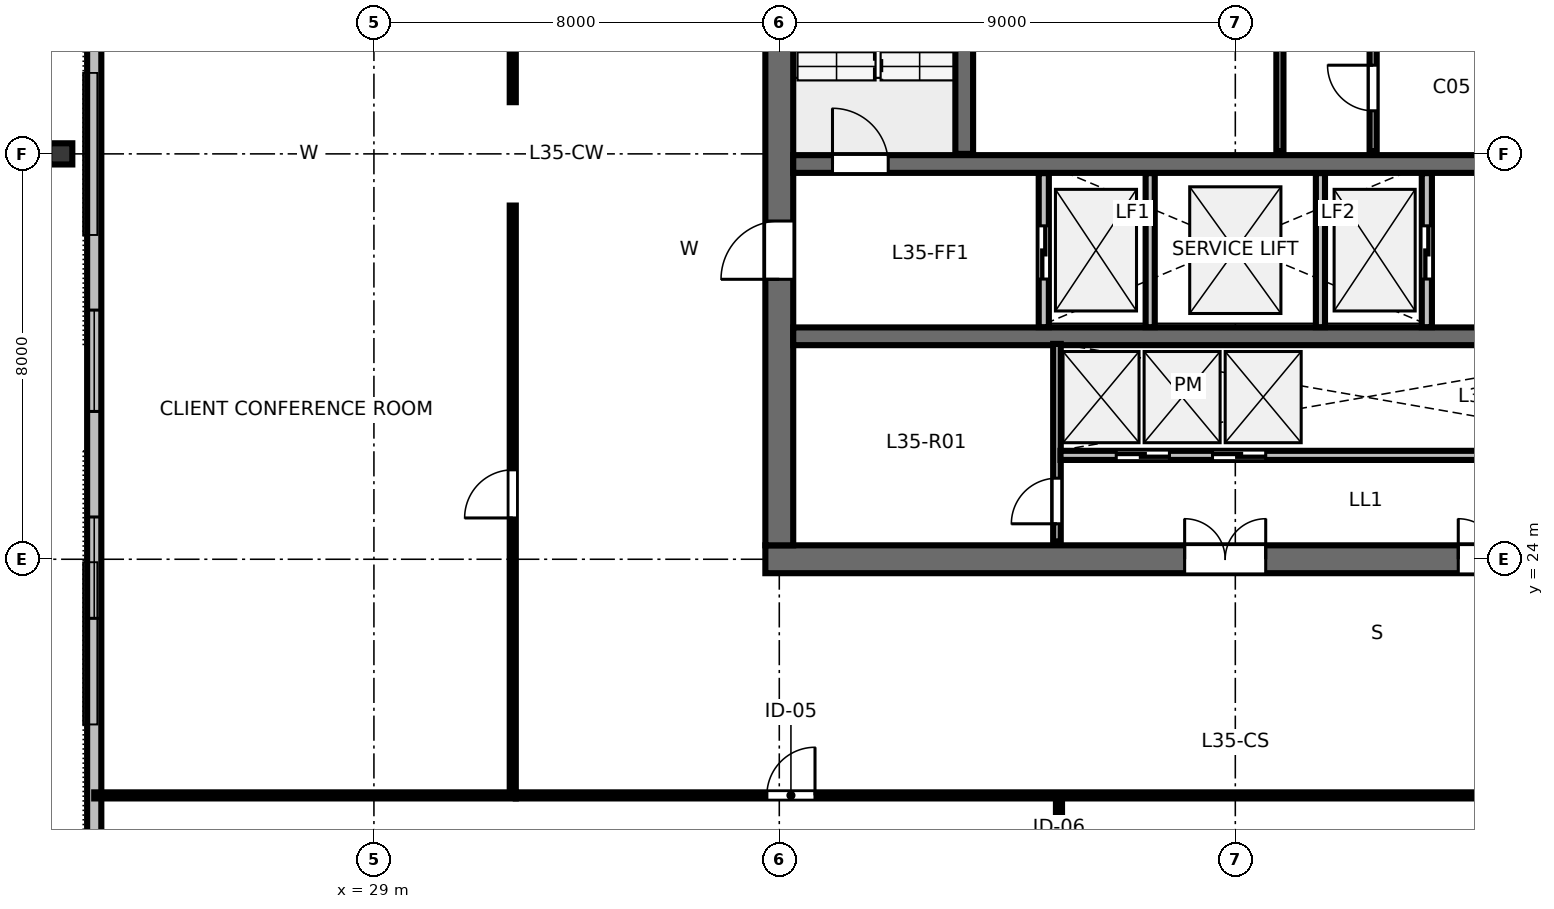
"""IFC4 building model, lengths in metres.
Left out: names, types, materials, properties, quantities, classifications, styles, units other than length and angle.
Written with IfcOpenShell. Run it as: python <this file> out.ifc"""

import sys

from ifc_helpers import new_model, si_unit, direction, frame, frame_2d, origin, origin_2d, place, context, subcontext, project, spatial, rectangle, i_section, extrude, element, fill, save


model = new_model("IFC4")
c1 = context("Model", 3, precision=1e-05, world=origin(), true_north=direction((0.0, 1.0)))
c2 = subcontext(c1, "Body", "Model", "MODEL_VIEW")
j1 = project(units=[si_unit("LENGTHUNIT", "METRE"), si_unit("PLANEANGLEUNIT", "RADIAN")], contexts=[c1])
p1 = place(None, origin())
s1 = spatial("IfcSite", under=j1, at=p1, CompositionType="ELEMENT")
p2 = place(p1, origin())
s2 = spatial("IfcBuilding", under=s1, at=p2, CompositionType="ELEMENT")
p3 = place(p2, frame((0.0, 0.0, 134.8)))
s3 = spatial("IfcBuildingStorey", under=s2, at=p3, CompositionType="ELEMENT", Elevation=134.8)
p4 = place(p3, frame((36.725, 24.0, 0.0), z_axis=(0.0, 0.0, 1.0), x_axis=(1.0, 0.0, 0.0)))
e1 = element("IfcWall", 1, at=p4, inside=s3, PredefinedType="SHEAR", context=c2, shape_type="SweptSolid", body=[
    extrude(rectangle(XDim=18.55, YDim=0.55, at=frame_2d((9.275, 0.0))), origin(), (0.0, 0.0, 1.0), 3.36),
])
p5 = place(p4, frame((8.275, 0.0, 0.0)))
e2 = element("IfcOpeningElement", 2, at=p5, cuts=e1, PredefinedType="OPENING", context=c2, shape_type="SweptSolid", body=[
    extrude(rectangle(XDim=1.6, YDim=2.15, at=frame_2d((0.8, 1.075))), frame((0.0, 0.285, 0.0), z_axis=(0.0, -1.0, 0.0), x_axis=(1.0, 0.0, 0.0)), (0.0, 0.0, 1.0), 0.57),
])
p6 = place(p4, frame((13.675, 0.0, 0.0)))
e3 = element("IfcOpeningElement", 3, at=p6, cuts=e1, PredefinedType="OPENING", context=c2, shape_type="SweptSolid", body=[
    extrude(rectangle(XDim=1.6, YDim=2.15, at=frame_2d((0.8, 1.075))), frame((0.0, 0.285, 0.0), z_axis=(0.0, -1.0, 0.0), x_axis=(1.0, 0.0, 0.0)), (0.0, 0.0, 1.0), 0.57),
])
p7 = place(p3, frame((37.0, 24.275, 0.0), z_axis=(0.0, 0.0, 1.0), x_axis=(0.0, 1.0, 0.0)))
e4 = element("IfcWall", 4, at=p7, inside=s3, PredefinedType="SHEAR", context=c2, shape_type="SweptSolid", body=[
    extrude(rectangle(XDim=15.45, YDim=0.55, at=frame_2d((7.725, 0.0))), origin(), (0.0, 0.0, 1.0), 3.36),
])
p8 = place(p7, frame((5.25, 0.0, 0.0)))
e5 = element("IfcOpeningElement", 5, at=p8, cuts=e4, PredefinedType="OPENING", context=c2, shape_type="SweptSolid", body=[
    extrude(rectangle(XDim=1.15, YDim=2.15, at=frame_2d((0.575, 1.075))), frame((0.0, 0.285, 0.0), z_axis=(0.0, -1.0, 0.0), x_axis=(1.0, 0.0, 0.0)), (0.0, 0.0, 1.0), 0.57),
])
p9 = place(p3, frame((37.275, 31.8, 0.0), z_axis=(0.0, 0.0, 1.0), x_axis=(1.0, 0.0, 0.0)))
e6 = element("IfcWall", 6, at=p9, inside=s3, PredefinedType="SHEAR", context=c2, shape_type="SweptSolid", body=[
    extrude(rectangle(XDim=17.45, YDim=0.35, at=frame_2d((8.725, 0.0))), origin(), (0.0, 0.0, 1.0), 3.36),
])
p10 = place(p9, frame((0.775, 0.0, 0.0)))
e7 = element("IfcOpeningElement", 7, at=p10, cuts=e6, PredefinedType="OPENING", context=c2, shape_type="SweptSolid", body=[
    extrude(rectangle(XDim=1.1, YDim=2.15, at=frame_2d((0.55, 1.075))), frame((0.0, 0.185, 0.0), z_axis=(0.0, -1.0, 0.0), x_axis=(1.0, 0.0, 0.0)), (0.0, 0.0, 1.0), 0.37),
])
p11 = place(p9, frame((14.675, 0.0, 0.0)))
e8 = element("IfcOpeningElement", 8, at=p11, cuts=e6, PredefinedType="OPENING", context=c2, shape_type="SweptSolid", body=[
    extrude(rectangle(XDim=1.1, YDim=2.15, at=frame_2d((0.55, 1.075))), frame((0.0, 0.185, 0.0), z_axis=(0.0, -1.0, 0.0), x_axis=(1.0, 0.0, 0.0)), (0.0, 0.0, 1.0), 0.37),
])
p12 = place(p3, frame((37.275, 28.4, 0.0), z_axis=(0.0, 0.0, 1.0), x_axis=(1.0, 0.0, 0.0)))
e9 = element("IfcWall", 9, at=p12, inside=s3, PredefinedType="SHEAR", context=c2, shape_type="SweptSolid", body=[
    extrude(rectangle(XDim=17.45, YDim=0.35, at=frame_2d((8.725, 0.0))), origin(), (0.0, 0.0, 1.0), 3.36),
])
p13 = place(p3, frame((22.82, 32.0, 0.0), z_axis=(-0.089001216718, 0.0, 0.996031517284), x_axis=(0.996031517284, 0.0, 0.089001216718)))
e10 = element("IfcColumn", 10, at=p13, inside=s3, PredefinedType="COLUMN", context=c2, shape_type="SweptSolid", body=[
    extrude(i_section(OverallWidth=0.418, OverallDepth=0.455, WebThickness=0.042, FlangeThickness=0.068, FilletRadius=0.025, at=origin_2d()), origin(), (0.0, 0.0, 1.0), 3.371),
])
p14 = place(p3, frame((23.48, 47.39, 0.0), z_axis=(0.0, 0.0, 1.0), x_axis=(0.0, -1.0, 0.0)))
e11 = element("IfcWall", 11, at=p14, inside=s3, PredefinedType="STANDARD", context=c2, shape_type="SweptSolid", body=[
    extrude(rectangle(XDim=30.78, YDim=0.28, at=frame_2d((15.39, 0.0))), origin(), (0.0, 0.0, 1.0), 3.36),
])
p15 = place(p14, frame((6.224, 0.0, 0.8)))
e12 = element("IfcOpeningElement", 12, at=p15, cuts=e11, PredefinedType="OPENING", context=c2, shape_type="SweptSolid", body=[
    extrude(rectangle(XDim=2.0, YDim=1.95, at=frame_2d((1.0, 0.975))), frame((0.0, 0.15, 0.0), z_axis=(0.0, -1.0, 0.0), x_axis=(1.0, 0.0, 0.0)), (0.0, 0.0, 1.0), 0.3),
])
p16 = place(p14, frame((10.307, 0.0, 0.8)))
e13 = element("IfcOpeningElement", 13, at=p16, cuts=e11, PredefinedType="OPENING", context=c2, shape_type="SweptSolid", body=[
    extrude(rectangle(XDim=2.0, YDim=1.95, at=frame_2d((1.0, 0.975))), frame((0.0, 0.15, 0.0), z_axis=(0.0, -1.0, 0.0), x_axis=(1.0, 0.0, 0.0)), (0.0, 0.0, 1.0), 0.3),
])
p17 = place(p14, frame((18.473, 0.0, 0.8)))
e14 = element("IfcOpeningElement", 14, at=p17, cuts=e11, PredefinedType="OPENING", context=c2, shape_type="SweptSolid", body=[
    extrude(rectangle(XDim=2.0, YDim=1.95, at=frame_2d((1.0, 0.975))), frame((0.0, 0.15, 0.0), z_axis=(0.0, -1.0, 0.0), x_axis=(1.0, 0.0, 0.0)), (0.0, 0.0, 1.0), 0.3),
])
p18 = place(p14, frame((22.556, 0.0, 0.8)))
e15 = element("IfcOpeningElement", 15, at=p18, cuts=e11, PredefinedType="OPENING", context=c2, shape_type="SweptSolid", body=[
    extrude(rectangle(XDim=2.0, YDim=1.95, at=frame_2d((1.0, 0.975))), frame((0.0, 0.15, 0.0), z_axis=(0.0, -1.0, 0.0), x_axis=(1.0, 0.0, 0.0)), (0.0, 0.0, 1.0), 0.3),
])
p19 = place(p3, frame((40.65, 32.0, 0.0), z_axis=(0.0, 0.0, 1.0), x_axis=(0.0, 1.0, 0.0)))
e16 = element("IfcWall", 16, at=p19, inside=s3, PredefinedType="SHEAR", context=c2, shape_type="SweptSolid", body=[
    extrude(rectangle(XDim=7.7, YDim=0.35, at=frame_2d((3.85, 0.0))), origin(), (0.0, 0.0, 1.0), 3.6),
])
p20 = place(p3, frame((46.88, 32.05, 0.0), z_axis=(0.0, 0.0, 1.0), x_axis=(0.0, 1.0, 0.0)))
e17 = element("IfcWall", 17, at=p20, inside=s3, PredefinedType="PARTITIONING", context=c2, shape_type="SweptSolid", body=[
    extrude(rectangle(XDim=7.6, YDim=0.14, at=frame_2d((3.8, 0.0))), origin(), (0.0, 0.0, 1.0), 3.36),
])
p21 = place(p20, frame((3.4, 0.0, 0.0)))
e18 = element("IfcOpeningElement", 18, at=p21, cuts=e17, PredefinedType="OPENING", context=c2, shape_type="SweptSolid", body=[
    extrude(rectangle(XDim=0.95, YDim=2.15, at=frame_2d((0.475, 1.075))), frame((0.0, 0.08, 0.0), z_axis=(0.0, -1.0, 0.0), x_axis=(1.0, 0.0, 0.0)), (0.0, 0.0, 1.0), 0.16),
])
p22 = place(p3, frame((48.72, 32.05, 0.0), z_axis=(0.0, 0.0, 1.0), x_axis=(0.0, 1.0, 0.0)))
e19 = element("IfcWall", 19, at=p22, inside=s3, PredefinedType="PARTITIONING", context=c2, shape_type="SweptSolid", body=[
    extrude(rectangle(XDim=7.6, YDim=0.14, at=frame_2d((3.8, 0.0))), origin(), (0.0, 0.0, 1.0), 3.36),
])
p23 = place(p22, frame((0.8, 0.0, 0.0)))
e20 = element("IfcOpeningElement", 20, at=p23, cuts=e19, PredefinedType="OPENING", context=c2, shape_type="SweptSolid", body=[
    extrude(rectangle(XDim=0.9, YDim=2.15, at=frame_2d((0.45, 1.075))), frame((0.0, 0.08, 0.0), z_axis=(0.0, -1.0, 0.0), x_axis=(1.0, 0.0, 0.0)), (0.0, 0.0, 1.0), 0.16),
])
p24 = place(p22, frame((3.35, 0.0, 0.0)))
e21 = element("IfcOpeningElement", 21, at=p24, cuts=e19, PredefinedType="OPENING", context=c2, shape_type="SweptSolid", body=[
    extrude(rectangle(XDim=0.9, YDim=2.15, at=frame_2d((0.45, 1.075))), frame((0.0, 0.08, 0.0), z_axis=(0.0, -1.0, 0.0), x_axis=(1.0, 0.0, 0.0)), (0.0, 0.0, 1.0), 0.16),
])
p25 = place(p22, frame((5.9, 0.0, 0.0)))
e22 = element("IfcOpeningElement", 22, at=p25, cuts=e19, PredefinedType="OPENING", context=c2, shape_type="SweptSolid", body=[
    extrude(rectangle(XDim=0.92, YDim=2.15, at=frame_2d((0.46, 1.075))), frame((0.0, 0.08, 0.0), z_axis=(0.0, -1.0, 0.0), x_axis=(1.0, 0.0, 0.0)), (0.0, 0.0, 1.0), 0.16),
])
p26 = place(p3, frame((42.22, 28.58, 0.0), z_axis=(0.0, 0.0, 1.0), x_axis=(0.0, 1.0, 0.0)))
e23 = element("IfcWall", 23, at=p26, inside=s3, PredefinedType="PARTITIONING", context=c2, shape_type="SweptSolid", body=[
    extrude(rectangle(XDim=3.04, YDim=0.2, at=frame_2d((1.52, 0.0))), origin(), (0.0, 0.0, 1.0), 3.36),
])
p27 = place(p26, frame((0.95, 0.0, 0.0)))
e24 = element("IfcOpeningElement", 24, at=p27, cuts=e23, PredefinedType="OPENING", context=c2, shape_type="SweptSolid", body=[
    extrude(rectangle(XDim=1.05, YDim=2.15, at=frame_2d((0.525, 1.075))), frame((0.0, 0.11, 0.0), z_axis=(0.0, -1.0, 0.0), x_axis=(1.0, 0.0, 0.0)), (0.0, 0.0, 1.0), 0.22),
])
p28 = place(p3, frame((49.78, 28.58, 0.0), z_axis=(0.0, 0.0, 1.0), x_axis=(0.0, 1.0, 0.0)))
e25 = element("IfcWall", 25, at=p28, inside=s3, PredefinedType="PARTITIONING", context=c2, shape_type="SweptSolid", body=[
    extrude(rectangle(XDim=3.04, YDim=0.2, at=frame_2d((1.52, 0.0))), origin(), (0.0, 0.0, 1.0), 3.36),
])
p29 = place(p28, frame((0.95, 0.0, 0.0)))
e26 = element("IfcOpeningElement", 26, at=p29, cuts=e25, PredefinedType="OPENING", context=c2, shape_type="SweptSolid", body=[
    extrude(rectangle(XDim=1.05, YDim=2.15, at=frame_2d((0.525, 1.075))), frame((0.0, 0.11, 0.0), z_axis=(0.0, -1.0, 0.0), x_axis=(1.0, 0.0, 0.0)), (0.0, 0.0, 1.0), 0.22),
])
for number, where, z_axis, x_axis in (
    (27, (44.32, 28.58, 0.0), (0.0, 0.0, 1.0), (0.0, 1.0, 0.0)),
    (28, (47.68, 28.58, 0.0), (0.0, 0.0, 1.0), (0.0, 1.0, 0.0)),
):
    element("IfcWall", number, at=place(p3, frame(where, z_axis=z_axis, x_axis=x_axis)), inside=s3, PredefinedType="PARTITIONING", context=c2, shape_type="SweptSolid", body=[
        extrude(rectangle(XDim=3.04, YDim=0.18, at=frame_2d((1.52, 0.0))), origin(), (0.0, 0.0, 1.0), 3.36),
    ])
p30 = place(p3, frame((42.48, 24.35, 0.0), z_axis=(0.0, 0.0, 1.0), x_axis=(0.0, 1.0, 0.0)))
e29 = element("IfcWall", 29, at=p30, inside=s3, PredefinedType="PARTITIONING", context=c2, shape_type="SweptSolid", body=[
    extrude(rectangle(XDim=3.9, YDim=0.15, at=frame_2d((1.95, 0.0))), origin(), (0.0, 0.0, 1.0), 3.36),
])
p31 = place(p30, frame((0.35, 0.0, 0.0)))
e30 = element("IfcOpeningElement", 30, at=p31, cuts=e29, PredefinedType="OPENING", context=c2, shape_type="SweptSolid", body=[
    extrude(rectangle(XDim=0.9, YDim=2.15, at=frame_2d((0.45, 1.075))), frame((0.0, 0.085, 0.0), z_axis=(0.0, -1.0, 0.0), x_axis=(1.0, 0.0, 0.0)), (0.0, 0.0, 1.0), 0.17),
])
p32 = place(p3, frame((42.55, 26.05, 0.0), z_axis=(0.0, 0.0, 1.0), x_axis=(1.0, 0.0, 0.0)))
e31 = element("IfcWall", 31, at=p32, inside=s3, PredefinedType="PARTITIONING", context=c2, shape_type="SweptSolid", body=[
    extrude(rectangle(XDim=12.05, YDim=0.18, at=frame_2d((6.025, 0.0))), origin(), (0.0, 0.0, 1.0), 3.36),
])
p33 = place(p32, frame((1.1, 0.0, 0.0)))
e32 = element("IfcOpeningElement", 32, at=p33, cuts=e31, PredefinedType="OPENING", context=c2, shape_type="SweptSolid", body=[
    extrude(rectangle(XDim=1.05, YDim=2.15, at=frame_2d((0.525, 1.075))), frame((0.0, 0.1, 0.0), z_axis=(0.0, -1.0, 0.0), x_axis=(1.0, 0.0, 0.0)), (0.0, 0.0, 1.0), 0.2),
])
p34 = place(p32, frame((3.0, 0.0, 0.0)))
e33 = element("IfcOpeningElement", 33, at=p34, cuts=e31, PredefinedType="OPENING", context=c2, shape_type="SweptSolid", body=[
    extrude(rectangle(XDim=1.05, YDim=2.15, at=frame_2d((0.525, 1.075))), frame((0.0, 0.1, 0.0), z_axis=(0.0, -1.0, 0.0), x_axis=(1.0, 0.0, 0.0)), (0.0, 0.0, 1.0), 0.2),
])
p35 = place(p3, frame((42.52, 19.34, 0.0), z_axis=(0.0, 0.0, 1.0), x_axis=(0.0, -1.0, 0.0)))
e34 = element("IfcWall", 34, at=p35, inside=s3, PredefinedType="PARTITIONING", context=c2, shape_type="SweptSolid", body=[
    extrude(rectangle(XDim=7.21, YDim=0.12, at=frame_2d((3.605, 0.0))), origin(), (0.0, 0.0, 1.0), 2.64),
])
p36 = place(p35, frame((1.4, 0.0, 0.0)))
e35 = element("IfcOpeningElement", 35, at=p36, cuts=e34, PredefinedType="OPENING", context=c2, shape_type="SweptSolid", body=[
    extrude(rectangle(XDim=0.9, YDim=2.15, at=frame_2d((0.45, 1.075))), frame((0.0, 0.07, 0.0), z_axis=(0.0, -1.0, 0.0), x_axis=(1.0, 0.0, 0.0)), (0.0, 0.0, 1.0), 0.14),
])
p37 = place(p3, frame((31.8, 19.34, 0.0), z_axis=(0.0, 0.0, 1.0), x_axis=(1.0, 0.0, 0.0)))
e36 = element("IfcWall", 36, at=p37, inside=s3, PredefinedType="PARTITIONING", context=c2, shape_type="SweptSolid", body=[
    extrude(rectangle(XDim=28.4, YDim=0.12, at=frame_2d((14.2, 0.0))), origin(), (0.0, 0.0, 1.0), 2.64),
])
p38 = place(p37, frame((4.955, 0.0, 0.0)))
e37 = element("IfcOpeningElement", 37, at=p38, cuts=e36, PredefinedType="OPENING", context=c2, shape_type="SweptSolid", body=[
    extrude(rectangle(XDim=0.95, YDim=2.15, at=frame_2d((0.475, 1.075))), frame((0.0, 0.07, 0.0), z_axis=(0.0, -1.0, 0.0), x_axis=(1.0, 0.0, 0.0)), (0.0, 0.0, 1.0), 0.14),
])
p39 = place(p37, frame((19.015, 0.0, 0.0)))
e38 = element("IfcOpeningElement", 38, at=p39, cuts=e36, PredefinedType="OPENING", context=c2, shape_type="SweptSolid", body=[
    extrude(rectangle(XDim=0.95, YDim=2.15, at=frame_2d((0.475, 1.075))), frame((0.0, 0.07, 0.0), z_axis=(0.0, -1.0, 0.0), x_axis=(1.0, 0.0, 0.0)), (0.0, 0.0, 1.0), 0.14),
])
p40 = place(p3, frame((31.74, 19.4, 0.0), z_axis=(0.0, 0.0, 1.0), x_axis=(0.0, 1.0, 0.0)))
e39 = element("IfcWall", 39, at=p40, inside=s3, PredefinedType="PARTITIONING", context=c2, shape_type="SweptSolid", body=[
    extrude(rectangle(XDim=11.58, YDim=0.12, at=frame_2d((5.79, 0.0))), origin(), (0.0, 0.0, 1.0), 2.64),
])
p41 = place(p40, frame((5.415, 0.0, 0.0)))
e40 = element("IfcOpeningElement", 40, at=p41, cuts=e39, PredefinedType="OPENING", context=c2, shape_type="SweptSolid", body=[
    extrude(rectangle(XDim=0.95, YDim=2.15, at=frame_2d((0.475, 1.075))), frame((0.0, 0.07, 0.0), z_axis=(0.0, -1.0, 0.0), x_axis=(1.0, 0.0, 0.0)), (0.0, 0.0, 1.0), 0.14),
])
p42 = place(p3, frame((31.74, 33.02, 0.0), z_axis=(0.0, 0.0, 1.0), x_axis=(0.0, 1.0, 0.0)))
e41 = element("IfcWall", 41, at=p42, inside=s3, PredefinedType="PARTITIONING", context=c2, shape_type="SweptSolid", body=[
    extrude(rectangle(XDim=11.58, YDim=0.12, at=frame_2d((5.79, 0.0))), origin(), (0.0, 0.0, 1.0), 2.64),
])
p43 = place(p42, frame((5.215, 0.0, 0.0)))
e42 = element("IfcOpeningElement", 42, at=p43, cuts=e41, PredefinedType="OPENING", context=c2, shape_type="SweptSolid", body=[
    extrude(rectangle(XDim=0.95, YDim=2.15, at=frame_2d((0.475, 1.075))), frame((0.0, 0.07, 0.0), z_axis=(0.0, -1.0, 0.0), x_axis=(1.0, 0.0, 0.0)), (0.0, 0.0, 1.0), 0.14),
])
p44 = place(p3, frame((31.8, 19.34, 0.0), z_axis=(0.0, 0.0, 1.0), x_axis=(-1.0, 0.0, 0.0)))
e43 = element("IfcWall", 43, at=p44, inside=s3, PredefinedType="PARTITIONING", context=c2, shape_type="SweptSolid", body=[
    extrude(rectangle(XDim=8.32, YDim=0.12, at=frame_2d((4.16, 0.0))), origin(), (0.0, 0.0, 1.0), 2.64),
])
p45 = place(p17, origin())
e44 = element("IfcWindow", 44, at=p45, inside=s3, PartitioningType="SINGLE_PANEL", PredefinedType="WINDOW", context=c2, shape_type="SweptSolid", body=[
    extrude(rectangle(XDim=2.0, YDim=1.95, at=frame_2d((1.0, 0.975))), frame((0.0, 0.03, 0.0), z_axis=(0.0, -1.0, 0.0), x_axis=(1.0, 0.0, 0.0)), (0.0, 0.0, 1.0), 0.06),
])
fill(e14, e44)
p46 = place(p18, origin())
e45 = element("IfcWindow", 45, at=p46, inside=s3, PartitioningType="SINGLE_PANEL", PredefinedType="WINDOW", context=c2, shape_type="SweptSolid", body=[
    extrude(rectangle(XDim=2.0, YDim=1.95, at=frame_2d((1.0, 0.975))), frame((0.0, 0.03, 0.0), z_axis=(0.0, -1.0, 0.0), x_axis=(1.0, 0.0, 0.0)), (0.0, 0.0, 1.0), 0.06),
])
fill(e15, e45)
p47 = place(p10, origin())
e46 = element("IfcDoor", 46, at=p47, inside=s3, OperationType="SINGLE_SWING_LEFT", PredefinedType="DOOR", context=c2, shape_type="SweptSolid", body=[
    extrude(rectangle(XDim=1.1, YDim=2.15, at=frame_2d((0.55, 1.075))), frame((0.0, 0.025, 0.0), z_axis=(0.0, -1.0, 0.0), x_axis=(1.0, 0.0, 0.0)), (0.0, 0.0, 1.0), 0.05),
])
fill(e7, e46)
p48 = place(p8, origin())
e47 = element("IfcDoor", 47, at=p48, inside=s3, OperationType="SINGLE_SWING_LEFT", PredefinedType="DOOR", context=c2, shape_type="SweptSolid", body=[
    extrude(rectangle(XDim=1.15, YDim=2.15, at=frame_2d((0.575, 1.075))), frame((0.0, 0.025, 0.0), z_axis=(0.0, -1.0, 0.0), x_axis=(1.0, 0.0, 0.0)), (0.0, 0.0, 1.0), 0.05),
])
fill(e5, e47)
p49 = place(p5, origin())
e48 = element("IfcDoor", 48, at=p49, inside=s3, OperationType="DOUBLE_DOOR_SINGLE_SWING", PredefinedType="DOOR", context=c2, shape_type="SweptSolid", body=[
    extrude(rectangle(XDim=1.6, YDim=2.15, at=frame_2d((0.8, 1.075))), frame((0.0, 0.025, 0.0), z_axis=(0.0, -1.0, 0.0), x_axis=(1.0, 0.0, 0.0)), (0.0, 0.0, 1.0), 0.05),
])
fill(e2, e48)
p50 = place(p6, origin())
e49 = element("IfcDoor", 49, at=p50, inside=s3, OperationType="DOUBLE_DOOR_SINGLE_SWING", PredefinedType="DOOR", context=c2, shape_type="SweptSolid", body=[
    extrude(rectangle(XDim=1.6, YDim=2.15, at=frame_2d((0.8, 1.075))), frame((0.0, 0.025, 0.0), z_axis=(0.0, -1.0, 0.0), x_axis=(1.0, 0.0, 0.0)), (0.0, 0.0, 1.0), 0.05),
])
fill(e3, e49)
p51 = place(p23, origin())
e50 = element("IfcDoor", 50, at=p51, inside=s3, OperationType="SINGLE_SWING_RIGHT", PredefinedType="DOOR", context=c2, shape_type="SweptSolid", body=[
    extrude(rectangle(XDim=0.9, YDim=2.15, at=frame_2d((0.45, 1.075))), frame((0.0, 0.025, 0.0), z_axis=(0.0, -1.0, 0.0), x_axis=(1.0, 0.0, 0.0)), (0.0, 0.0, 1.0), 0.05),
])
fill(e20, e50)
p52 = place(p27, origin())
e51 = element("IfcDoor", 51, at=p52, inside=s3, OperationType="SLIDING_TO_LEFT", PredefinedType="DOOR", context=c2, shape_type="SweptSolid", body=[
    extrude(rectangle(XDim=1.05, YDim=2.15, at=frame_2d((0.525, 1.075))), frame((0.0, 0.025, 0.0), z_axis=(0.0, -1.0, 0.0), x_axis=(1.0, 0.0, 0.0)), (0.0, 0.0, 1.0), 0.05),
])
fill(e24, e51)
p53 = place(p29, origin())
e52 = element("IfcDoor", 52, at=p53, inside=s3, OperationType="SLIDING_TO_RIGHT", PredefinedType="DOOR", context=c2, shape_type="SweptSolid", body=[
    extrude(rectangle(XDim=1.05, YDim=2.15, at=frame_2d((0.525, 1.075))), frame((0.0, 0.025, 0.0), z_axis=(0.0, -1.0, 0.0), x_axis=(1.0, 0.0, 0.0)), (0.0, 0.0, 1.0), 0.05),
])
fill(e26, e52)
p54 = place(p31, origin())
e53 = element("IfcDoor", 53, at=p54, inside=s3, OperationType="SINGLE_SWING_LEFT", PredefinedType="DOOR", context=c2, shape_type="SweptSolid", body=[
    extrude(rectangle(XDim=0.9, YDim=2.15, at=frame_2d((0.45, 1.075))), frame((0.0, 0.025, 0.0), z_axis=(0.0, -1.0, 0.0), x_axis=(1.0, 0.0, 0.0)), (0.0, 0.0, 1.0), 0.05),
])
fill(e30, e53)
p55 = place(p33, origin())
e54 = element("IfcDoor", 54, at=p55, inside=s3, OperationType="SLIDING_TO_LEFT", PredefinedType="DOOR", context=c2, shape_type="SweptSolid", body=[
    extrude(rectangle(XDim=1.05, YDim=2.15, at=frame_2d((0.525, 1.075))), frame((0.0, 0.025, 0.0), z_axis=(0.0, -1.0, 0.0), x_axis=(1.0, 0.0, 0.0)), (0.0, 0.0, 1.0), 0.05),
])
fill(e32, e54)
p56 = place(p34, origin())
e55 = element("IfcDoor", 55, at=p56, inside=s3, OperationType="SLIDING_TO_RIGHT", PredefinedType="DOOR", context=c2, shape_type="SweptSolid", body=[
    extrude(rectangle(XDim=1.05, YDim=2.15, at=frame_2d((0.525, 1.075))), frame((0.0, 0.025, 0.0), z_axis=(0.0, -1.0, 0.0), x_axis=(1.0, 0.0, 0.0)), (0.0, 0.0, 1.0), 0.05),
])
fill(e33, e55)
p57 = place(p38, origin())
e56 = element("IfcDoor", 56, at=p57, inside=s3, OperationType="SINGLE_SWING_RIGHT", PredefinedType="DOOR", context=c2, shape_type="SweptSolid", body=[
    extrude(rectangle(XDim=0.95, YDim=2.15, at=frame_2d((0.475, 1.075))), frame((0.0, 0.025, 0.0), z_axis=(0.0, -1.0, 0.0), x_axis=(1.0, 0.0, 0.0)), (0.0, 0.0, 1.0), 0.05),
])
fill(e37, e56)
p58 = place(p41, origin())
e57 = element("IfcDoor", 57, at=p58, inside=s3, OperationType="SINGLE_SWING_LEFT", PredefinedType="DOOR", context=c2, shape_type="SweptSolid", body=[
    extrude(rectangle(XDim=0.95, YDim=2.15, at=frame_2d((0.475, 1.075))), frame((0.0, 0.025, 0.0), z_axis=(0.0, -1.0, 0.0), x_axis=(1.0, 0.0, 0.0)), (0.0, 0.0, 1.0), 0.05),
])
fill(e40, e57)
save(model, sys.argv[1])
